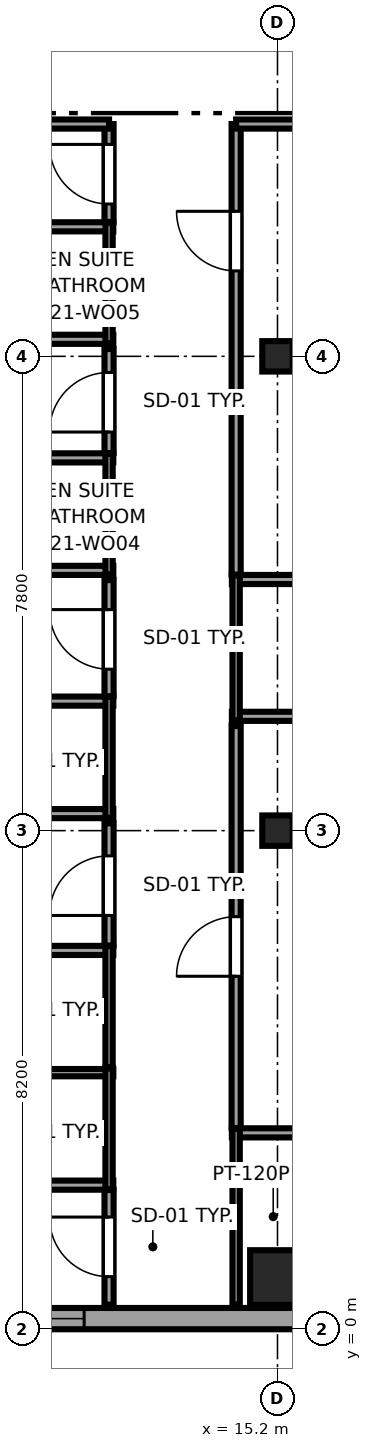
"""IFC4 building model, lengths in metres.
Left out: names, types, materials, properties, quantities, classifications, styles, units other than length and angle.
Written with IfcOpenShell. Run it as: python <this file> out.ifc"""

import sys

from ifc_helpers import new_model, si_unit, direction, frame, frame_2d, origin, origin_2d, place, context, subcontext, project, spatial, rectangle, i_section, extrude, source, transform, mapped, element, fill, save


model = new_model("IFC4")
c1 = context("Model", 3, precision=1e-05, world=origin(), true_north=direction((0.0, 1.0)))
c2 = subcontext(c1, "Body", "Model", "MODEL_VIEW")
j1 = project(units=[si_unit("LENGTHUNIT", "METRE"), si_unit("PLANEANGLEUNIT", "RADIAN")], contexts=[c1])
p1 = place(None, origin())
s1 = spatial("IfcSite", under=j1, at=p1, CompositionType="ELEMENT")
p2 = place(p1, origin())
s2 = spatial("IfcBuilding", under=s1, at=p2, CompositionType="ELEMENT")
p3 = place(p2, frame((0.0, 0.0, 85.25)))
s3 = spatial("IfcBuildingStorey", under=s2, at=p3, CompositionType="ELEMENT", Elevation=85.25)
m1 = source(origin(), c2, "Body", "SweptSolid", [
    extrude(rectangle(XDim=0.9, YDim=0.9, at=origin_2d()), origin(), (0.0, 0.0, 1.0), 3.55),
])
p4 = place(p3, frame((15.2, 0.85, 0.0), z_axis=(0.0, 0.0, 1.0), x_axis=(1.0, 0.0, 0.0)))
e1 = element("IfcColumn", 1, at=p4, inside=s3, PredefinedType="COLUMN", context=c2, shape_type="MappedRepresentation", body=[
    mapped(m1, transform((0.0, 0.0, 0.0), x_axis=(1.0, 0.0, 0.0), y_axis=(0.0, 1.0, 0.0), z_axis=(0.0, 0.0, 1.0), scale=1.0)),
])
m2 = source(origin(), c2, "Body", "SweptSolid", [
    extrude(i_section(OverallWidth=0.5, OverallDepth=0.5, WebThickness=0.022, FlangeThickness=0.034, at=origin_2d()), origin(), (0.0, 0.0, 1.0), 3.55),
])
for number, where, z_axis, x_axis in (
    (2, (15.2, 8.2, 0.0), (0.0, 0.0, 1.0), (1.0, 0.0, 0.0)),
    (3, (15.2, 16.0, 0.0), (0.0, 0.0, 1.0), (1.0, 0.0, 0.0)),
):
    element("IfcColumn", number, at=place(p3, frame(where, z_axis=z_axis, x_axis=x_axis)), inside=s3, PredefinedType="COLUMN", context=c2, shape_type="MappedRepresentation", body=[
        mapped(m2, transform((0.0, 0.0, 0.0), x_axis=(1.0, 0.0, 0.0), y_axis=(0.0, 1.0, 0.0), z_axis=(0.0, 0.0, 1.0), scale=1.0)),
    ])
p5 = place(p3, frame((4.617, 0.175, 0.0), z_axis=(0.0, 0.0, 1.0), x_axis=(1.0, 0.0, 0.0)))
e4 = element("IfcWall", 4, at=p5, inside=s3, PredefinedType="SOLIDWALL", context=c2, shape_type="SweptSolid", body=[
    extrude(rectangle(XDim=18.008, YDim=0.35, at=frame_2d((9.004, 0.0))), origin(), (0.0, 0.0, 1.0), 3.37),
])
p6 = place(p5, frame((5.303, 0.0, 0.68)))
e5 = element("IfcOpeningElement", 5, at=p6, cuts=e4, PredefinedType="OPENING", context=c2, shape_type="SweptSolid", body=[
    extrude(rectangle(XDim=2.1, YDim=1.9, at=frame_2d((1.05, 0.95))), frame((0.0, 0.185, 0.0), z_axis=(0.0, -1.0, 0.0), x_axis=(1.0, 0.0, 0.0)), (0.0, 0.0, 1.0), 0.37),
])
p7 = place(p5, frame((14.257, 0.0, 0.68)))
e6 = element("IfcOpeningElement", 6, at=p7, cuts=e4, PredefinedType="OPENING", context=c2, shape_type="SweptSolid", body=[
    extrude(rectangle(XDim=2.1, YDim=1.9, at=frame_2d((1.05, 0.95))), frame((0.0, 0.185, 0.0), z_axis=(0.0, -1.0, 0.0), x_axis=(1.0, 0.0, 0.0)), (0.0, 0.0, 1.0), 0.37),
])
p8 = place(p3, frame((9.91, 2.37, 0.0), z_axis=(0.0, 0.0, 1.0), x_axis=(1.0, 0.0, 0.0)))
e7 = element("IfcWall", 7, at=p8, inside=s3, PredefinedType="PARTITIONING", context=c2, shape_type="SweptSolid", body=[
    extrude(rectangle(XDim=2.59, YDim=0.15, at=frame_2d((1.295, 0.0))), origin(), (0.0, 0.0, 1.0), 3.37),
])
p9 = place(p3, frame((9.91, 4.22, 0.0), z_axis=(0.0, 0.0, 1.0), x_axis=(1.0, 0.0, 0.0)))
e8 = element("IfcWall", 8, at=p9, inside=s3, PredefinedType="PLUMBINGWALL", context=c2, shape_type="SweptSolid", body=[
    extrude(rectangle(XDim=2.59, YDim=0.12, at=frame_2d((1.295, 0.0))), origin(), (0.0, 0.0, 1.0), 3.37),
])
p10 = place(p3, frame((12.43, 2.3, 0.0), z_axis=(0.0, 0.0, 1.0), x_axis=(0.0, 1.0, 0.0)))
e9 = element("IfcWall", 9, at=p10, inside=s3, PredefinedType="PLUMBINGWALL", context=c2, shape_type="SweptSolid", body=[
    extrude(rectangle(XDim=1.99, YDim=0.12, at=frame_2d((0.995, 0.0))), origin(), (0.0, 0.0, 1.0), 3.37),
])
p11 = place(p3, frame((9.91, 6.23, 0.0), z_axis=(0.0, 0.0, 1.0), x_axis=(1.0, 0.0, 0.0)))
e10 = element("IfcWall", 10, at=p11, inside=s3, PredefinedType="PARTITIONING", context=c2, shape_type="SweptSolid", body=[
    extrude(rectangle(XDim=2.59, YDim=0.15, at=frame_2d((1.295, 0.0))), origin(), (0.0, 0.0, 1.0), 3.37),
])
p12 = place(p3, frame((12.43, 4.31, 0.0), z_axis=(0.0, 0.0, 1.0), x_axis=(0.0, 1.0, 0.0)))
e11 = element("IfcWall", 11, at=p12, inside=s3, PredefinedType="PLUMBINGWALL", context=c2, shape_type="SweptSolid", body=[
    extrude(rectangle(XDim=1.99, YDim=0.12, at=frame_2d((0.995, 0.0))), origin(), (0.0, 0.0, 1.0), 3.37),
])
p13 = place(p3, frame((0.405, 8.48, 0.0), z_axis=(0.0, 0.0, 1.0), x_axis=(1.0, 0.0, 0.0)))
e12 = element("IfcWall", 12, at=p13, inside=s3, PredefinedType="PARTITIONING", context=c2, shape_type="SweptSolid", body=[
    extrude(rectangle(XDim=12.095, YDim=0.15, at=frame_2d((6.047, 0.0))), origin(), (0.0, 0.0, 1.0), 3.37),
])
p14 = place(p3, frame((9.91, 10.33, 0.0), z_axis=(0.0, 0.0, 1.0), x_axis=(1.0, 0.0, 0.0)))
e13 = element("IfcWall", 13, at=p14, inside=s3, PredefinedType="PARTITIONING", context=c2, shape_type="SweptSolid", body=[
    extrude(rectangle(XDim=2.59, YDim=0.15, at=frame_2d((1.295, 0.0))), origin(), (0.0, 0.0, 1.0), 3.37),
])
p15 = place(p3, frame((12.43, 8.41, 0.0), z_axis=(0.0, 0.0, 1.0), x_axis=(0.0, 1.0, 0.0)))
e14 = element("IfcWall", 14, at=p15, inside=s3, PredefinedType="PLUMBINGWALL", context=c2, shape_type="SweptSolid", body=[
    extrude(rectangle(XDim=1.99, YDim=0.12, at=frame_2d((0.995, 0.0))), origin(), (0.0, 0.0, 1.0), 3.37),
])
p16 = place(p3, frame((0.405, 12.48, 0.0), z_axis=(0.0, 0.0, 1.0), x_axis=(1.0, 0.0, 0.0)))
e15 = element("IfcWall", 15, at=p16, inside=s3, PredefinedType="PARTITIONING", context=c2, shape_type="SweptSolid", body=[
    extrude(rectangle(XDim=12.095, YDim=0.15, at=frame_2d((6.047, 0.0))), origin(), (0.0, 0.0, 1.0), 3.37),
])
p17 = place(p3, frame((9.91, 14.33, 0.0), z_axis=(0.0, 0.0, 1.0), x_axis=(1.0, 0.0, 0.0)))
e16 = element("IfcWall", 16, at=p17, inside=s3, PredefinedType="PARTITIONING", context=c2, shape_type="SweptSolid", body=[
    extrude(rectangle(XDim=2.59, YDim=0.15, at=frame_2d((1.295, 0.0))), origin(), (0.0, 0.0, 1.0), 3.37),
])
p18 = place(p3, frame((12.43, 12.41, 0.0), z_axis=(0.0, 0.0, 1.0), x_axis=(0.0, 1.0, 0.0)))
e17 = element("IfcWall", 17, at=p18, inside=s3, PredefinedType="PLUMBINGWALL", context=c2, shape_type="SweptSolid", body=[
    extrude(rectangle(XDim=1.99, YDim=0.12, at=frame_2d((0.995, 0.0))), origin(), (0.0, 0.0, 1.0), 3.37),
])
p19 = place(p3, frame((0.405, 16.28, 0.0), z_axis=(0.0, 0.0, 1.0), x_axis=(1.0, 0.0, 0.0)))
e18 = element("IfcWall", 18, at=p19, inside=s3, PredefinedType="PARTITIONING", context=c2, shape_type="SweptSolid", body=[
    extrude(rectangle(XDim=12.095, YDim=0.15, at=frame_2d((6.047, 0.0))), origin(), (0.0, 0.0, 1.0), 3.37),
])
p20 = place(p3, frame((9.91, 18.13, 0.0), z_axis=(0.0, 0.0, 1.0), x_axis=(1.0, 0.0, 0.0)))
e19 = element("IfcWall", 19, at=p20, inside=s3, PredefinedType="PARTITIONING", context=c2, shape_type="SweptSolid", body=[
    extrude(rectangle(XDim=2.59, YDim=0.15, at=frame_2d((1.295, 0.0))), origin(), (0.0, 0.0, 1.0), 3.37),
])
p21 = place(p3, frame((12.43, 16.21, 0.0), z_axis=(0.0, 0.0, 1.0), x_axis=(0.0, 1.0, 0.0)))
e20 = element("IfcWall", 20, at=p21, inside=s3, PredefinedType="PLUMBINGWALL", context=c2, shape_type="SweptSolid", body=[
    extrude(rectangle(XDim=1.99, YDim=0.12, at=frame_2d((0.995, 0.0))), origin(), (0.0, 0.0, 1.0), 3.37),
])
p22 = place(p3, frame((14.45, 3.23, 0.0), z_axis=(0.0, 0.0, 1.0), x_axis=(1.0, 0.0, 0.0)))
e21 = element("IfcWall", 21, at=p22, inside=s3, PredefinedType="PARTITIONING", context=c2, shape_type="SweptSolid", body=[
    extrude(rectangle(XDim=3.74, YDim=0.15, at=frame_2d((1.87, 0.0))), origin(), (0.0, 0.0, 1.0), 3.37),
])
p23 = place(p3, frame((14.52, 0.405, 0.0), z_axis=(0.0, 0.0, 1.0), x_axis=(0.0, 1.0, 0.0)))
e22 = element("IfcWall", 22, at=p23, inside=s3, PredefinedType="PLUMBINGWALL", context=c2, shape_type="SweptSolid", body=[
    extrude(rectangle(XDim=2.895, YDim=0.12, at=frame_2d((1.448, 0.0))), origin(), (0.0, 0.0, 1.0), 3.37),
])
p24 = place(p3, frame((14.45, 10.08, 0.0), z_axis=(0.0, 0.0, 1.0), x_axis=(1.0, 0.0, 0.0)))
e23 = element("IfcWall", 23, at=p24, inside=s3, PredefinedType="PARTITIONING", context=c2, shape_type="SweptSolid", body=[
    extrude(rectangle(XDim=7.9, YDim=0.15, at=frame_2d((3.95, 0.0))), origin(), (0.0, 0.0, 1.0), 3.37),
])
p25 = place(p3, frame((14.45, 12.33, 0.0), z_axis=(0.0, 0.0, 1.0), x_axis=(1.0, 0.0, 0.0)))
e24 = element("IfcWall", 24, at=p25, inside=s3, PredefinedType="PARTITIONING", context=c2, shape_type="SweptSolid", body=[
    extrude(rectangle(XDim=2.59, YDim=0.15, at=frame_2d((1.295, 0.0))), origin(), (0.0, 0.0, 1.0), 3.37),
])
p26 = place(p3, frame((14.52, 10.01, 0.0), z_axis=(0.0, 0.0, 1.0), x_axis=(0.0, 1.0, 0.0)))
e25 = element("IfcWall", 25, at=p26, inside=s3, PredefinedType="PLUMBINGWALL", context=c2, shape_type="SweptSolid", body=[
    extrude(rectangle(XDim=2.39, YDim=0.12, at=frame_2d((1.195, 0.0))), origin(), (0.0, 0.0, 1.0), 3.37),
])
p27 = place(p3, frame((12.43, 0.405, 0.0), z_axis=(0.0, 0.0, 1.0), x_axis=(0.0, 1.0, 0.0)))
e26 = element("IfcWall", 26, at=p27, inside=s3, PredefinedType="PARTITIONING", context=c2, shape_type="SweptSolid", body=[
    extrude(rectangle(XDim=1.885, YDim=0.15, at=frame_2d((0.942, 0.0))), origin(), (0.0, 0.0, 1.0), 3.37),
])
p28 = place(p27, frame((0.46, 0.0, 0.0)))
e27 = element("IfcOpeningElement", 27, at=p28, cuts=e26, PredefinedType="OPENING", context=c2, shape_type="SweptSolid", body=[
    extrude(rectangle(XDim=0.98, YDim=2.12, at=frame_2d((0.49, 1.06))), frame((0.0, 0.085, 0.0), z_axis=(0.0, -1.0, 0.0), x_axis=(1.0, 0.0, 0.0)), (0.0, 0.0, 1.0), 0.17),
])
p29 = place(p3, frame((12.43, 6.31, 0.0), z_axis=(0.0, 0.0, 1.0), x_axis=(0.0, 1.0, 0.0)))
e28 = element("IfcWall", 28, at=p29, inside=s3, PredefinedType="PARTITIONING", context=c2, shape_type="SweptSolid", body=[
    extrude(rectangle(XDim=2.01, YDim=0.15, at=frame_2d((1.005, 0.0))), origin(), (0.0, 0.0, 1.0), 3.37),
])
p30 = place(p29, frame((0.495, 0.0, 0.0)))
e29 = element("IfcOpeningElement", 29, at=p30, cuts=e28, PredefinedType="OPENING", context=c2, shape_type="SweptSolid", body=[
    extrude(rectangle(XDim=0.98, YDim=2.12, at=frame_2d((0.49, 1.06))), frame((0.0, 0.085, 0.0), z_axis=(0.0, -1.0, 0.0), x_axis=(1.0, 0.0, 0.0)), (0.0, 0.0, 1.0), 0.17),
])
p31 = place(p3, frame((12.43, 10.41, 0.0), z_axis=(0.0, 0.0, 1.0), x_axis=(0.0, 1.0, 0.0)))
e30 = element("IfcWall", 30, at=p31, inside=s3, PredefinedType="PARTITIONING", context=c2, shape_type="SweptSolid", body=[
    extrude(rectangle(XDim=1.91, YDim=0.15, at=frame_2d((0.955, 0.0))), origin(), (0.0, 0.0, 1.0), 3.37),
])
p32 = place(p31, frame((0.445, 0.0, 0.0)))
e31 = element("IfcOpeningElement", 31, at=p32, cuts=e30, PredefinedType="OPENING", context=c2, shape_type="SweptSolid", body=[
    extrude(rectangle(XDim=0.98, YDim=2.12, at=frame_2d((0.49, 1.06))), frame((0.0, 0.085, 0.0), z_axis=(0.0, -1.0, 0.0), x_axis=(1.0, 0.0, 0.0)), (0.0, 0.0, 1.0), 0.17),
])
p33 = place(p3, frame((12.43, 14.41, 0.0), z_axis=(0.0, 0.0, 1.0), x_axis=(0.0, 1.0, 0.0)))
e32 = element("IfcWall", 32, at=p33, inside=s3, PredefinedType="PARTITIONING", context=c2, shape_type="SweptSolid", body=[
    extrude(rectangle(XDim=1.71, YDim=0.15, at=frame_2d((0.855, 0.0))), origin(), (0.0, 0.0, 1.0), 3.37),
])
p34 = place(p33, frame((0.345, 0.0, 0.0)))
e33 = element("IfcOpeningElement", 33, at=p34, cuts=e32, PredefinedType="OPENING", context=c2, shape_type="SweptSolid", body=[
    extrude(rectangle(XDim=0.98, YDim=2.12, at=frame_2d((0.49, 1.06))), frame((0.0, 0.085, 0.0), z_axis=(0.0, -1.0, 0.0), x_axis=(1.0, 0.0, 0.0)), (0.0, 0.0, 1.0), 0.17),
])
p35 = place(p3, frame((12.43, 18.21, 0.0), z_axis=(0.0, 0.0, 1.0), x_axis=(0.0, 1.0, 0.0)))
e34 = element("IfcWall", 34, at=p35, inside=s3, PredefinedType="PARTITIONING", context=c2, shape_type="SweptSolid", body=[
    extrude(rectangle(XDim=1.61, YDim=0.15, at=frame_2d((0.805, 0.0))), origin(), (0.0, 0.0, 1.0), 3.37),
])
p36 = place(p35, frame((0.295, 0.0, 0.0)))
e35 = element("IfcOpeningElement", 35, at=p36, cuts=e34, PredefinedType="OPENING", context=c2, shape_type="SweptSolid", body=[
    extrude(rectangle(XDim=0.98, YDim=2.12, at=frame_2d((0.49, 1.06))), frame((0.0, 0.085, 0.0), z_axis=(0.0, -1.0, 0.0), x_axis=(1.0, 0.0, 0.0)), (0.0, 0.0, 1.0), 0.17),
])
p37 = place(p3, frame((0.405, 19.82, 0.0), z_axis=(0.0, 0.0, 1.0), x_axis=(1.0, 0.0, 0.0)))
e36 = element("IfcWall", 36, at=p37, inside=s3, PredefinedType="PARTITIONING", context=c2, shape_type="SweptSolid", body=[
    extrude(rectangle(XDim=12.025, YDim=0.15, at=frame_2d((6.012, 0.0))), origin(), (0.0, 0.0, 1.0), 3.37),
])
p38 = place(p3, frame((14.52, 3.31, 0.0), z_axis=(0.0, 0.0, 1.0), x_axis=(0.0, 1.0, 0.0)))
e37 = element("IfcWall", 37, at=p38, inside=s3, PredefinedType="PARTITIONING", context=c2, shape_type="SweptSolid", body=[
    extrude(rectangle(XDim=6.61, YDim=0.15, at=frame_2d((3.305, 0.0))), origin(), (0.0, 0.0, 1.0), 3.37),
])
p39 = place(p38, frame((2.495, 0.0, 0.0)))
e38 = element("IfcOpeningElement", 38, at=p39, cuts=e37, PredefinedType="OPENING", context=c2, shape_type="SweptSolid", body=[
    extrude(rectangle(XDim=0.98, YDim=2.12, at=frame_2d((0.49, 1.06))), frame((0.0, 0.085, 0.0), z_axis=(0.0, -1.0, 0.0), x_axis=(1.0, 0.0, 0.0)), (0.0, 0.0, 1.0), 0.17),
])
p40 = place(p3, frame((14.52, 12.41, 0.0), z_axis=(0.0, 0.0, 1.0), x_axis=(0.0, 1.0, 0.0)))
e39 = element("IfcWall", 39, at=p40, inside=s3, PredefinedType="PARTITIONING", context=c2, shape_type="SweptSolid", body=[
    extrude(rectangle(XDim=7.41, YDim=0.15, at=frame_2d((3.705, 0.0))), origin(), (0.0, 0.0, 1.0), 3.37),
])
p41 = place(p40, frame((4.995, 0.0, 0.0)))
e40 = element("IfcOpeningElement", 40, at=p41, cuts=e39, PredefinedType="OPENING", context=c2, shape_type="SweptSolid", body=[
    extrude(rectangle(XDim=0.98, YDim=2.12, at=frame_2d((0.49, 1.06))), frame((0.0, 0.085, 0.0), z_axis=(0.0, -1.0, 0.0), x_axis=(1.0, 0.0, 0.0)), (0.0, 0.0, 1.0), 0.17),
])
p42 = place(p3, frame((14.52, 19.82, 0.0), z_axis=(0.0, 0.0, 1.0), x_axis=(1.0, 0.0, 0.0)))
e41 = element("IfcWall", 41, at=p42, inside=s3, PredefinedType="PARTITIONING", context=c2, shape_type="SweptSolid", body=[
    extrude(rectangle(XDim=7.83, YDim=0.15, at=frame_2d((3.915, 0.0))), origin(), (0.0, 0.0, 1.0), 3.37),
])
m3 = source(origin(), c2, "Body", "SweptSolid", [
    extrude(rectangle(XDim=2.1, YDim=1.9, at=frame_2d((1.05, 0.95))), frame((0.0, 0.09, 0.0), z_axis=(0.0, -1.0, 0.0), x_axis=(1.0, 0.0, 0.0)), (0.0, 0.0, 1.0), 0.06),
])
p43 = place(p6, origin())
e42 = element("IfcWindow", 42, at=p43, inside=s3, PartitioningType="TRIPLE_PANEL_HORIZONTAL", PredefinedType="WINDOW", context=c2, shape_type="MappedRepresentation", body=[
    mapped(m3, transform((0.0, 0.0, 0.0), x_axis=(1.0, 0.0, 0.0), y_axis=(0.0, 1.0, 0.0), z_axis=(0.0, 0.0, 1.0), scale=1.0)),
])
fill(e5, e42)
m4 = source(origin(), c2, "Body", "SweptSolid", [
    extrude(rectangle(XDim=0.98, YDim=2.12, at=frame_2d((0.49, 1.06))), frame((0.0, 0.025, 0.0), z_axis=(0.0, -1.0, 0.0), x_axis=(1.0, 0.0, 0.0)), (0.0, 0.0, 1.0), 0.05),
])
p44 = place(p28, origin())
e43 = element("IfcDoor", 43, at=p44, inside=s3, OperationType="SINGLE_SWING_RIGHT", PredefinedType="DOOR", context=c2, shape_type="MappedRepresentation", body=[
    mapped(m4, transform((0.0, 0.0, 0.0), x_axis=(1.0, 0.0, 0.0), y_axis=(0.0, 1.0, 0.0), z_axis=(0.0, 0.0, 1.0), scale=1.0)),
])
fill(e27, e43)
p45 = place(p30, origin())
e44 = element("IfcDoor", 44, at=p45, inside=s3, OperationType="SINGLE_SWING_LEFT", PredefinedType="DOOR", context=c2, shape_type="MappedRepresentation", body=[
    mapped(m4, transform((0.0, 0.0, 0.0), x_axis=(1.0, 0.0, 0.0), y_axis=(0.0, 1.0, 0.0), z_axis=(0.0, 0.0, 1.0), scale=1.0)),
])
fill(e29, e44)
p46 = place(p32, origin())
e45 = element("IfcDoor", 45, at=p46, inside=s3, OperationType="SINGLE_SWING_RIGHT", PredefinedType="DOOR", context=c2, shape_type="MappedRepresentation", body=[
    mapped(m4, transform((0.0, 0.0, 0.0), x_axis=(1.0, 0.0, 0.0), y_axis=(0.0, 1.0, 0.0), z_axis=(0.0, 0.0, 1.0), scale=1.0)),
])
fill(e31, e45)
p47 = place(p34, origin())
e46 = element("IfcDoor", 46, at=p47, inside=s3, OperationType="SINGLE_SWING_LEFT", PredefinedType="DOOR", context=c2, shape_type="MappedRepresentation", body=[
    mapped(m4, transform((0.0, 0.0, 0.0), x_axis=(1.0, 0.0, 0.0), y_axis=(0.0, 1.0, 0.0), z_axis=(0.0, 0.0, 1.0), scale=1.0)),
])
fill(e33, e46)
p48 = place(p36, origin())
e47 = element("IfcDoor", 47, at=p48, inside=s3, OperationType="SINGLE_SWING_RIGHT", PredefinedType="DOOR", context=c2, shape_type="MappedRepresentation", body=[
    mapped(m4, transform((0.0, 0.0, 0.0), x_axis=(1.0, 0.0, 0.0), y_axis=(0.0, 1.0, 0.0), z_axis=(0.0, 0.0, 1.0), scale=1.0)),
])
fill(e35, e47)
p49 = place(p39, origin())
e48 = element("IfcDoor", 48, at=p49, inside=s3, OperationType="SINGLE_SWING_LEFT", PredefinedType="DOOR", context=c2, shape_type="MappedRepresentation", body=[
    mapped(m4, transform((0.0, 0.0, 0.0), x_axis=(1.0, 0.0, 0.0), y_axis=(0.0, 1.0, 0.0), z_axis=(0.0, 0.0, 1.0), scale=1.0)),
])
fill(e38, e48)
p50 = place(p41, origin())
e49 = element("IfcDoor", 49, at=p50, inside=s3, OperationType="SINGLE_SWING_RIGHT", PredefinedType="DOOR", context=c2, shape_type="MappedRepresentation", body=[
    mapped(m4, transform((0.0, 0.0, 0.0), x_axis=(1.0, 0.0, 0.0), y_axis=(0.0, 1.0, 0.0), z_axis=(0.0, 0.0, 1.0), scale=1.0)),
])
fill(e40, e49)
save(model, sys.argv[1])
